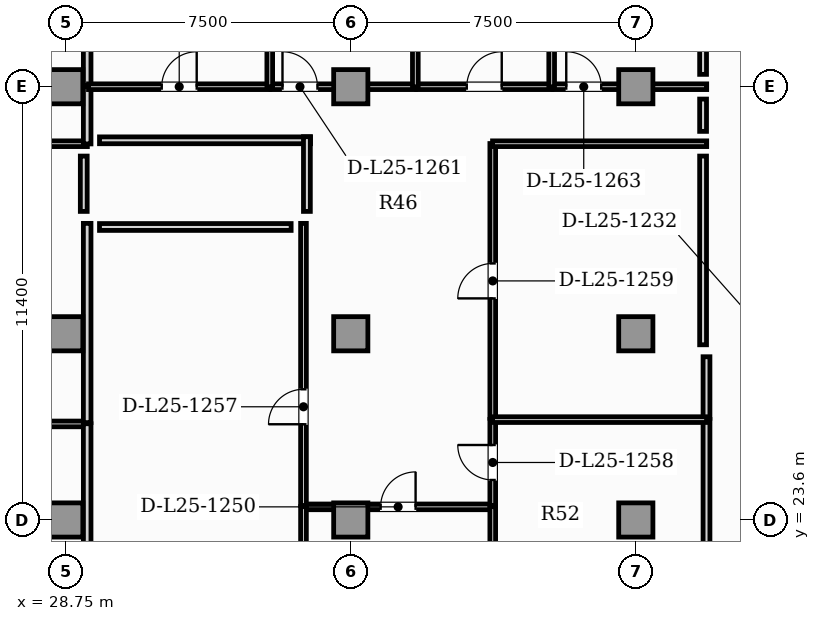
"""IFC4 building model, lengths in metres.
Left out: names, types, materials, properties, quantities, classifications, styles, units other than length and angle.
Written with IfcOpenShell. Run it as: python <this file> out.ifc"""

import sys

from ifc_helpers import new_model, si_unit, direction, frame, frame_2d, origin, origin_2d, place, context, subcontext, project, spatial, rectangle, extrude, element, fill, save


model = new_model("IFC4")
c1 = context("Model", 3, precision=1e-05, world=origin(), true_north=direction((0.0, 1.0)))
c2 = subcontext(c1, "Body", "Model", "MODEL_VIEW")
j1 = project(units=[si_unit("LENGTHUNIT", "METRE"), si_unit("PLANEANGLEUNIT", "RADIAN")], contexts=[c1])
p1 = place(None, origin())
s1 = spatial("IfcSite", under=j1, at=p1, CompositionType="ELEMENT")
p2 = place(p1, origin())
s2 = spatial("IfcBuilding", under=s1, at=p2, CompositionType="ELEMENT")
p3 = place(p2, frame((0.0, 0.0, 104.15)))
s3 = spatial("IfcBuildingStorey", under=s2, at=p3, CompositionType="ELEMENT", Elevation=104.15)
for number, where, z_axis, x_axis in (
    (1, (28.75, 23.6, 0.0), (0.0, 0.0, 1.0), (1.0, 0.0, 0.0)),
    (2, (36.25, 23.6, 0.0), (0.0, 0.0, 1.0), (1.0, 0.0, 0.0)),
    (3, (43.75, 23.6, 0.0), (0.0, 0.0, 1.0), (1.0, 0.0, 0.0)),
    (4, (28.75, 28.5, 0.0), (0.0, 0.0, 1.0), (1.0, 0.0, 0.0)),
    (5, (36.25, 28.5, 0.0), (0.0, 0.0, 1.0), (1.0, 0.0, 0.0)),
    (6, (43.75, 28.5, 0.0), (0.0, 0.0, 1.0), (1.0, 0.0, 0.0)),
    (7, (28.75, 35.0, 0.0), (0.0, 0.0, 1.0), (1.0, 0.0, 0.0)),
    (8, (36.25, 35.0, 0.0), (0.0, 0.0, 1.0), (1.0, 0.0, 0.0)),
    (9, (43.75, 35.0, 0.0), (0.0, 0.0, 1.0), (1.0, 0.0, 0.0)),
):
    element("IfcColumn", number, at=place(p3, frame(where, z_axis=z_axis, x_axis=x_axis)), inside=s3, PredefinedType="COLUMN", context=c2, shape_type="SweptSolid", body=[
        extrude(rectangle(XDim=0.9, YDim=0.9, at=origin_2d()), origin(), (0.0, 0.0, 1.0), 3.85),
    ])
p4 = place(p3, frame((45.61, 21.012, 0.0), z_axis=(0.0, 0.0, 1.0), x_axis=(0.0, 1.0, 0.0)))
e10 = element("IfcWall", 10, at=p4, inside=s3, PredefinedType="PARTITIONING", context=c2, shape_type="SweptSolid", body=[
    extrude(rectangle(XDim=5.234, YDim=0.18, at=frame_2d((2.617, 0.0))), origin(), (0.0, 0.0, 1.0), 3.6),
])
p5 = place(p3, frame((45.61, 26.276, 0.0), z_axis=(0.0, 0.0, 1.0), x_axis=(0.0, 1.0, 0.0)))
e11 = element("IfcWall", 11, at=p5, inside=s3, PredefinedType="PARTITIONING", context=c2, shape_type="SweptSolid", body=[
    extrude(rectangle(XDim=1.619, YDim=0.18, at=frame_2d((0.81, 0.0))), origin(), (0.0, 0.0, 1.0), 3.6),
])
p6 = place(p3, frame((23.015, 33.5, 0.0), z_axis=(0.0, 0.0, 1.0), x_axis=(1.0, 0.0, 0.0)))
e12 = element("IfcWall", 12, at=p6, inside=s3, PredefinedType="PARTITIONING", context=c2, shape_type="SweptSolid", body=[
    extrude(rectangle(XDim=6.304, YDim=0.15, at=frame_2d((3.152, 0.0))), origin(), (0.0, 0.0, 1.0), 3.6),
])
p7 = place(p3, frame((25.119, 35.0, 0.0), z_axis=(0.0, 0.0, 1.0), x_axis=(1.0, 0.0, 0.0)))
e13 = element("IfcWall", 13, at=p7, inside=s3, PredefinedType="PARTITIONING", context=c2, shape_type="SweptSolid", body=[
    extrude(rectangle(XDim=4.2, YDim=0.15, at=frame_2d((2.1, 0.0))), origin(), (0.0, 0.0, 1.0), 2.983),
])
p8 = place(p7, frame((1.64, 0.0, 0.0)))
e14 = element("IfcOpeningElement", 14, at=p8, cuts=e13, PredefinedType="OPENING", context=c2, shape_type="SweptSolid", body=[
    extrude(rectangle(XDim=0.92, YDim=2.1, at=frame_2d((0.46, 1.05))), frame((0.0, 0.085, 0.0), z_axis=(0.0, -1.0, 0.0), x_axis=(1.0, 0.0, 0.0)), (0.0, 0.0, 1.0), 0.17),
])
p9 = place(p3, frame((29.314, 33.495, 0.0), z_axis=(0.0, 0.0, 1.0), x_axis=(0.0, 1.0, 0.0)))
e15 = element("IfcWall", 15, at=p9, inside=s3, PredefinedType="PARTITIONING", context=c2, shape_type="SweptSolid", body=[
    extrude(rectangle(XDim=1.51, YDim=0.2, at=frame_2d((0.755, 0.0))), origin(), (0.0, 0.0, 1.0), 3.6),
])
p10 = place(p3, frame((23.015, 26.127, 0.0), z_axis=(0.0, 0.0, 1.0), x_axis=(1.0, 0.0, 0.0)))
e16 = element("IfcWall", 16, at=p10, inside=s3, PredefinedType="PARTITIONING", context=c2, shape_type="SweptSolid", body=[
    extrude(rectangle(XDim=6.304, YDim=0.15, at=frame_2d((3.152, 0.0))), origin(), (0.0, 0.0, 1.0), 3.6),
])
p11 = place(p3, frame((29.314, 20.899, 0.0), z_axis=(0.0, 0.0, 1.0), x_axis=(0.0, 1.0, 0.0)))
e17 = element("IfcWall", 17, at=p11, inside=s3, PredefinedType="PARTITIONING", context=c2, shape_type="SweptSolid", body=[
    extrude(rectangle(XDim=5.234, YDim=0.2, at=frame_2d((2.617, 0.0))), origin(), (0.0, 0.0, 1.0), 3.6),
])
p12 = place(p3, frame((29.314, 26.162, 0.0), z_axis=(0.0, 0.0, 1.0), x_axis=(0.0, 1.0, 0.0)))
e18 = element("IfcWall", 18, at=p12, inside=s3, PredefinedType="PARTITIONING", context=c2, shape_type="SweptSolid", body=[
    extrude(rectangle(XDim=5.242, YDim=0.2, at=frame_2d((2.621, 0.0))), origin(), (0.0, 0.0, 1.0), 3.6),
])
p13 = place(p3, frame((29.314, 35.035, 0.0), z_axis=(0.0, 0.0, 1.0), x_axis=(0.0, 1.0, 0.0)))
e19 = element("IfcWall", 19, at=p13, inside=s3, PredefinedType="PARTITIONING", context=c2, shape_type="SweptSolid", body=[
    extrude(rectangle(XDim=7.955, YDim=0.2, at=frame_2d((3.978, 0.0))), origin(), (0.0, 0.0, 1.0), 3.6),
])
p14 = place(p3, frame((35.0, 23.945, 0.0), z_axis=(0.0, 0.0, 1.0), x_axis=(1.0, 0.0, 0.0)))
e20 = element("IfcWall", 20, at=p14, inside=s3, PredefinedType="PARTITIONING", context=c2, shape_type="SweptSolid", body=[
    extrude(rectangle(XDim=4.99, YDim=0.15, at=frame_2d((2.495, 0.0))), origin(), (0.0, 0.0, 1.0), 3.6),
])
p15 = place(p14, frame((2.035, 0.0, 0.0)))
e21 = element("IfcOpeningElement", 21, at=p15, cuts=e20, PredefinedType="OPENING", context=c2, shape_type="SweptSolid", body=[
    extrude(rectangle(XDim=0.92, YDim=2.1, at=frame_2d((0.46, 1.05))), frame((0.0, 0.085, 0.0), z_axis=(0.0, -1.0, 0.0), x_axis=(1.0, 0.0, 0.0)), (0.0, 0.0, 1.0), 0.17),
])
p16 = place(p3, frame((35.006, 17.465, 0.0), z_axis=(0.0, 0.0, 1.0), x_axis=(0.0, 1.0, 0.0)))
e22 = element("IfcWall", 22, at=p16, inside=s3, PredefinedType="PARTITIONING", context=c2, shape_type="SweptSolid", body=[
    extrude(rectangle(XDim=6.485, YDim=0.15, at=frame_2d((3.243, 0.0))), origin(), (0.0, 0.0, 1.0), 3.6),
])
p17 = place(p16, frame((2.783, 0.0, 0.0)))
e23 = element("IfcOpeningElement", 23, at=p17, cuts=e22, PredefinedType="OPENING", context=c2, shape_type="SweptSolid", body=[
    extrude(rectangle(XDim=0.92, YDim=2.1, at=frame_2d((0.46, 1.05))), frame((0.0, 0.085, 0.0), z_axis=(0.0, -1.0, 0.0), x_axis=(1.0, 0.0, 0.0)), (0.0, 0.0, 1.0), 0.17),
])
p18 = place(p3, frame((39.986, 21.012, 0.0), z_axis=(0.0, 0.0, 1.0), x_axis=(0.0, 1.0, 0.0)))
e24 = element("IfcWall", 24, at=p18, inside=s3, PredefinedType="PARTITIONING", context=c2, shape_type="SweptSolid", body=[
    extrude(rectangle(XDim=2.938, YDim=0.15, at=frame_2d((1.469, 0.0))), origin(), (0.0, 0.0, 1.0), 3.6),
])
p19 = place(p18, frame((1.009, 0.0, 0.0)))
e25 = element("IfcOpeningElement", 25, at=p19, cuts=e24, PredefinedType="OPENING", context=c2, shape_type="SweptSolid", body=[
    extrude(rectangle(XDim=0.92, YDim=2.1, at=frame_2d((0.46, 1.05))), frame((0.0, 0.085, 0.0), z_axis=(0.0, -1.0, 0.0), x_axis=(1.0, 0.0, 0.0)), (0.0, 0.0, 1.0), 0.17),
])
p20 = place(p3, frame((35.006, 23.98, 0.0), z_axis=(0.0, 0.0, 1.0), x_axis=(0.0, 1.0, 0.0)))
e26 = element("IfcWall", 26, at=p20, inside=s3, PredefinedType="PARTITIONING", context=c2, shape_type="SweptSolid", body=[
    extrude(rectangle(XDim=7.424, YDim=0.15, at=frame_2d((3.712, 0.0))), origin(), (0.0, 0.0, 1.0), 3.6),
])
p21 = place(p20, frame((2.138, 0.0, 0.0)))
e27 = element("IfcOpeningElement", 27, at=p21, cuts=e26, PredefinedType="OPENING", context=c2, shape_type="SweptSolid", body=[
    extrude(rectangle(XDim=0.92, YDim=2.1, at=frame_2d((0.46, 1.05))), frame((0.0, 0.085, 0.0), z_axis=(0.0, -1.0, 0.0), x_axis=(1.0, 0.0, 0.0)), (0.0, 0.0, 1.0), 0.17),
])
p22 = place(p3, frame((39.986, 23.98, 0.0), z_axis=(0.0, 0.0, 1.0), x_axis=(0.0, 1.0, 0.0)))
e28 = element("IfcWall", 28, at=p22, inside=s3, PredefinedType="PARTITIONING", context=c2, shape_type="SweptSolid", body=[
    extrude(rectangle(XDim=2.265, YDim=0.15, at=frame_2d((1.133, 0.0))), origin(), (0.0, 0.0, 1.0), 3.6),
])
p23 = place(p22, frame((0.673, 0.0, 0.0)))
e29 = element("IfcOpeningElement", 29, at=p23, cuts=e28, PredefinedType="OPENING", context=c2, shape_type="SweptSolid", body=[
    extrude(rectangle(XDim=0.92, YDim=2.1, at=frame_2d((0.46, 1.05))), frame((0.0, 0.085, 0.0), z_axis=(0.0, -1.0, 0.0), x_axis=(1.0, 0.0, 0.0)), (0.0, 0.0, 1.0), 0.17),
])
p24 = place(p3, frame((39.986, 26.276, 0.0), z_axis=(0.0, 0.0, 1.0), x_axis=(0.0, 1.0, 0.0)))
e30 = element("IfcWall", 30, at=p24, inside=s3, PredefinedType="PARTITIONING", context=c2, shape_type="SweptSolid", body=[
    extrude(rectangle(XDim=7.229, YDim=0.15, at=frame_2d((3.615, 0.0))), origin(), (0.0, 0.0, 1.0), 3.6),
])
p25 = place(p24, frame((3.155, 0.0, 0.0)))
e31 = element("IfcOpeningElement", 31, at=p25, cuts=e30, PredefinedType="OPENING", context=c2, shape_type="SweptSolid", body=[
    extrude(rectangle(XDim=0.92, YDim=2.1, at=frame_2d((0.46, 1.05))), frame((0.0, 0.085, 0.0), z_axis=(0.0, -1.0, 0.0), x_axis=(1.0, 0.0, 0.0)), (0.0, 0.0, 1.0), 0.17),
])
p26 = place(p3, frame((39.981, 33.5, 0.0), z_axis=(0.0, 0.0, 1.0), x_axis=(1.0, 0.0, 0.0)))
e32 = element("IfcWall", 32, at=p26, inside=s3, PredefinedType="PARTITIONING", context=c2, shape_type="SweptSolid", body=[
    extrude(rectangle(XDim=5.634, YDim=0.15, at=frame_2d((2.817, 0.0))), origin(), (0.0, 0.0, 1.0), 3.6),
])
p27 = place(p3, frame((29.349, 35.0, 0.0), z_axis=(0.0, 0.0, 1.0), x_axis=(1.0, 0.0, 0.0)))
e33 = element("IfcWall", 33, at=p27, inside=s3, PredefinedType="PARTITIONING", context=c2, shape_type="SweptSolid", body=[
    extrude(rectangle(XDim=4.774, YDim=0.15, at=frame_2d((2.387, 0.0))), origin(), (0.0, 0.0, 1.0), 2.983),
])
p28 = place(p27, frame((1.927, 0.0, 0.0)))
e34 = element("IfcOpeningElement", 34, at=p28, cuts=e33, PredefinedType="OPENING", context=c2, shape_type="SweptSolid", body=[
    extrude(rectangle(XDim=0.92, YDim=2.1, at=frame_2d((0.46, 1.05))), frame((0.0, 0.085, 0.0), z_axis=(0.0, -1.0, 0.0), x_axis=(1.0, 0.0, 0.0)), (0.0, 0.0, 1.0), 0.17),
])
p29 = place(p3, frame((34.153, 35.0, 0.0), z_axis=(0.0, 0.0, 1.0), x_axis=(1.0, 0.0, 0.0)))
e35 = element("IfcWall", 35, at=p29, inside=s3, PredefinedType="PARTITIONING", context=c2, shape_type="SweptSolid", body=[
    extrude(rectangle(XDim=3.801, YDim=0.15, at=frame_2d((1.9, 0.0))), origin(), (0.0, 0.0, 1.0), 2.983),
])
p30 = place(p29, frame((0.3, 0.0, 0.0)))
e36 = element("IfcOpeningElement", 36, at=p30, cuts=e35, PredefinedType="OPENING", context=c2, shape_type="SweptSolid", body=[
    extrude(rectangle(XDim=0.92, YDim=2.1, at=frame_2d((0.46, 1.05))), frame((0.0, 0.085, 0.0), z_axis=(0.0, -1.0, 0.0), x_axis=(1.0, 0.0, 0.0)), (0.0, 0.0, 1.0), 0.17),
])
p31 = place(p3, frame((37.984, 35.0, 0.0), z_axis=(0.0, 0.0, 1.0), x_axis=(1.0, 0.0, 0.0)))
e37 = element("IfcWall", 37, at=p31, inside=s3, PredefinedType="PARTITIONING", context=c2, shape_type="SweptSolid", body=[
    extrude(rectangle(XDim=3.557, YDim=0.15, at=frame_2d((1.779, 0.0))), origin(), (0.0, 0.0, 1.0), 2.983),
])
p32 = place(p31, frame((1.319, 0.0, 0.0)))
e38 = element("IfcOpeningElement", 38, at=p32, cuts=e37, PredefinedType="OPENING", context=c2, shape_type="SweptSolid", body=[
    extrude(rectangle(XDim=0.92, YDim=2.1, at=frame_2d((0.46, 1.05))), frame((0.0, 0.085, 0.0), z_axis=(0.0, -1.0, 0.0), x_axis=(1.0, 0.0, 0.0)), (0.0, 0.0, 1.0), 0.17),
])
p33 = place(p3, frame((41.571, 35.0, 0.0), z_axis=(0.0, 0.0, 1.0), x_axis=(1.0, 0.0, 0.0)))
e39 = element("IfcWall", 39, at=p33, inside=s3, PredefinedType="PARTITIONING", context=c2, shape_type="SweptSolid", body=[
    extrude(rectangle(XDim=4.044, YDim=0.15, at=frame_2d((2.022, 0.0))), origin(), (0.0, 0.0, 1.0), 2.983),
])
p34 = place(p33, frame((0.349, 0.0, 0.0)))
e40 = element("IfcOpeningElement", 40, at=p34, cuts=e39, PredefinedType="OPENING", context=c2, shape_type="SweptSolid", body=[
    extrude(rectangle(XDim=0.92, YDim=2.1, at=frame_2d((0.46, 1.05))), frame((0.0, 0.085, 0.0), z_axis=(0.0, -1.0, 0.0), x_axis=(1.0, 0.0, 0.0)), (0.0, 0.0, 1.0), 0.17),
])
p35 = place(p3, frame((39.981, 26.241, 0.0), z_axis=(0.0, 0.0, 1.0), x_axis=(1.0, 0.0, 0.0)))
e41 = element("IfcWall", 41, at=p35, inside=s3, PredefinedType="PARTITIONING", context=c2, shape_type="SweptSolid", body=[
    extrude(rectangle(XDim=5.634, YDim=0.15, at=frame_2d((2.817, 0.0))), origin(), (0.0, 0.0, 1.0), 3.6),
])
for number, where, z_axis, x_axis in (
    (42, (34.118, 34.995, 0.0), (0.0, 0.0, 1.0), (0.0, 1.0, 0.0)),
    (43, (37.949, 34.995, 0.0), (0.0, 0.0, 1.0), (0.0, 1.0, 0.0)),
    (44, (41.536, 34.995, 0.0), (0.0, 0.0, 1.0), (0.0, 1.0, 0.0)),
):
    element("IfcWall", number, at=place(p3, frame(where, z_axis=z_axis, x_axis=x_axis)), inside=s3, PredefinedType="PARTITIONING", context=c2, shape_type="SweptSolid", body=[
        extrude(rectangle(XDim=7.995, YDim=0.15, at=frame_2d((3.998, 0.0))), origin(), (0.0, 0.0, 1.0), 3.6),
    ])
p36 = place(p3, frame((29.224, 33.175, 0.0), z_axis=(0.0, 0.0, 1.0), x_axis=(0.0, -1.0, 0.0)))
e45 = element("IfcWall", 45, at=p36, inside=s3, PredefinedType="PARTITIONING", context=c2, shape_type="SweptSolid", body=[
    extrude(rectangle(XDim=1.456, YDim=0.18, at=frame_2d((0.728, 0.0))), origin(), (0.0, 0.0, 1.0), 3.6),
])
p37 = place(p3, frame((35.191, 33.59, 0.0), z_axis=(0.0, 0.0, 1.0), x_axis=(-1.0, 0.0, 0.0)))
e46 = element("IfcWall", 46, at=p37, inside=s3, PredefinedType="PARTITIONING", context=c2, shape_type="SweptSolid", body=[
    extrude(rectangle(XDim=5.552, YDim=0.18, at=frame_2d((2.776, 0.0))), origin(), (0.0, 0.0, 1.0), 3.6),
])
p38 = place(p3, frame((45.52, 34.675, 0.0), z_axis=(0.0, 0.0, 1.0), x_axis=(0.0, -1.0, 0.0)))
e47 = element("IfcWall", 47, at=p38, inside=s3, PredefinedType="PARTITIONING", context=c2, shape_type="SweptSolid", body=[
    extrude(rectangle(XDim=0.85, YDim=0.18, at=frame_2d((0.425, 0.0))), origin(), (0.0, 0.0, 1.0), 3.6),
])
p39 = place(p3, frame((35.096, 31.719, 0.0), z_axis=(0.0, 0.0, 1.0), x_axis=(0.0, 1.0, 0.0)))
e48 = element("IfcWall", 48, at=p39, inside=s3, PredefinedType="PARTITIONING", context=c2, shape_type="SweptSolid", body=[
    extrude(rectangle(XDim=1.966, YDim=0.18, at=frame_2d((0.983, 0.0))), origin(), (0.0, 0.0, 1.0), 3.6),
])
p40 = place(p3, frame((29.639, 31.309, 0.0), z_axis=(0.0, 0.0, 1.0), x_axis=(1.0, 0.0, 0.0)))
e49 = element("IfcWall", 49, at=p40, inside=s3, PredefinedType="PARTITIONING", context=c2, shape_type="SweptSolid", body=[
    extrude(rectangle(XDim=5.042, YDim=0.18, at=frame_2d((2.521, 0.0))), origin(), (0.0, 0.0, 1.0), 3.6),
])
p41 = place(p3, frame((45.52, 33.175, 0.0), z_axis=(0.0, 0.0, 1.0), x_axis=(0.0, -1.0, 0.0)))
e50 = element("IfcWall", 50, at=p41, inside=s3, PredefinedType="PARTITIONING", context=c2, shape_type="SweptSolid", body=[
    extrude(rectangle(XDim=4.965, YDim=0.18, at=frame_2d((2.482, 0.0))), origin(), (0.0, 0.0, 1.0), 3.6),
])
p42 = place(p3, frame((45.52, 42.99, 0.0), z_axis=(0.0, 0.0, 1.0), x_axis=(0.0, -1.0, 0.0)))
e51 = element("IfcWall", 51, at=p42, inside=s3, PredefinedType="PARTITIONING", context=c2, shape_type="SweptSolid", body=[
    extrude(rectangle(XDim=7.665, YDim=0.18, at=frame_2d((3.833, 0.0))), origin(), (0.0, 0.0, 1.0), 3.6),
])
p43 = place(p15, origin())
e52 = element("IfcDoor", 52, at=p43, inside=s3, OperationType="SINGLE_SWING_RIGHT", PredefinedType="DOOR", context=c2, shape_type="SweptSolid", body=[
    extrude(rectangle(XDim=0.92, YDim=2.1, at=frame_2d((0.46, 1.05))), frame((0.0, 0.025, 0.0), z_axis=(0.0, -1.0, 0.0), x_axis=(1.0, 0.0, 0.0)), (0.0, 0.0, 1.0), 0.05),
])
fill(e21, e52)
p44 = place(p21, origin())
e53 = element("IfcDoor", 53, at=p44, inside=s3, OperationType="SINGLE_SWING_LEFT", PredefinedType="DOOR", context=c2, shape_type="SweptSolid", body=[
    extrude(rectangle(XDim=0.92, YDim=2.1, at=frame_2d((0.46, 1.05))), frame((0.0, 0.025, 0.0), z_axis=(0.0, -1.0, 0.0), x_axis=(1.0, 0.0, 0.0)), (0.0, 0.0, 1.0), 0.05),
])
fill(e27, e53)
p45 = place(p23, origin())
e54 = element("IfcDoor", 54, at=p45, inside=s3, OperationType="SINGLE_SWING_RIGHT", PredefinedType="DOOR", context=c2, shape_type="SweptSolid", body=[
    extrude(rectangle(XDim=0.92, YDim=2.1, at=frame_2d((0.46, 1.05))), frame((0.0, 0.025, 0.0), z_axis=(0.0, -1.0, 0.0), x_axis=(1.0, 0.0, 0.0)), (0.0, 0.0, 1.0), 0.05),
])
fill(e29, e54)
p46 = place(p25, origin())
e55 = element("IfcDoor", 55, at=p46, inside=s3, OperationType="SINGLE_SWING_LEFT", PredefinedType="DOOR", context=c2, shape_type="SweptSolid", body=[
    extrude(rectangle(XDim=0.92, YDim=2.1, at=frame_2d((0.46, 1.05))), frame((0.0, 0.025, 0.0), z_axis=(0.0, -1.0, 0.0), x_axis=(1.0, 0.0, 0.0)), (0.0, 0.0, 1.0), 0.05),
])
fill(e31, e55)
p47 = place(p28, origin())
e56 = element("IfcDoor", 56, at=p47, inside=s3, OperationType="SINGLE_SWING_RIGHT", PredefinedType="DOOR", context=c2, shape_type="SweptSolid", body=[
    extrude(rectangle(XDim=0.92, YDim=2.1, at=frame_2d((0.46, 1.05))), frame((0.0, 0.025, 0.0), z_axis=(0.0, -1.0, 0.0), x_axis=(1.0, 0.0, 0.0)), (0.0, 0.0, 1.0), 0.05),
])
fill(e34, e56)
p48 = place(p30, origin())
e57 = element("IfcDoor", 57, at=p48, inside=s3, OperationType="SINGLE_SWING_LEFT", PredefinedType="DOOR", context=c2, shape_type="SweptSolid", body=[
    extrude(rectangle(XDim=0.92, YDim=2.1, at=frame_2d((0.46, 1.05))), frame((0.0, 0.025, 0.0), z_axis=(0.0, -1.0, 0.0), x_axis=(1.0, 0.0, 0.0)), (0.0, 0.0, 1.0), 0.05),
])
fill(e36, e57)
p49 = place(p32, origin())
e58 = element("IfcDoor", 58, at=p49, inside=s3, OperationType="SINGLE_SWING_RIGHT", PredefinedType="DOOR", context=c2, shape_type="SweptSolid", body=[
    extrude(rectangle(XDim=0.92, YDim=2.1, at=frame_2d((0.46, 1.05))), frame((0.0, 0.025, 0.0), z_axis=(0.0, -1.0, 0.0), x_axis=(1.0, 0.0, 0.0)), (0.0, 0.0, 1.0), 0.05),
])
fill(e38, e58)
p50 = place(p34, origin())
e59 = element("IfcDoor", 59, at=p50, inside=s3, OperationType="SINGLE_SWING_LEFT", PredefinedType="DOOR", context=c2, shape_type="SweptSolid", body=[
    extrude(rectangle(XDim=0.92, YDim=2.1, at=frame_2d((0.46, 1.05))), frame((0.0, 0.025, 0.0), z_axis=(0.0, -1.0, 0.0), x_axis=(1.0, 0.0, 0.0)), (0.0, 0.0, 1.0), 0.05),
])
fill(e40, e59)
save(model, sys.argv[1])
